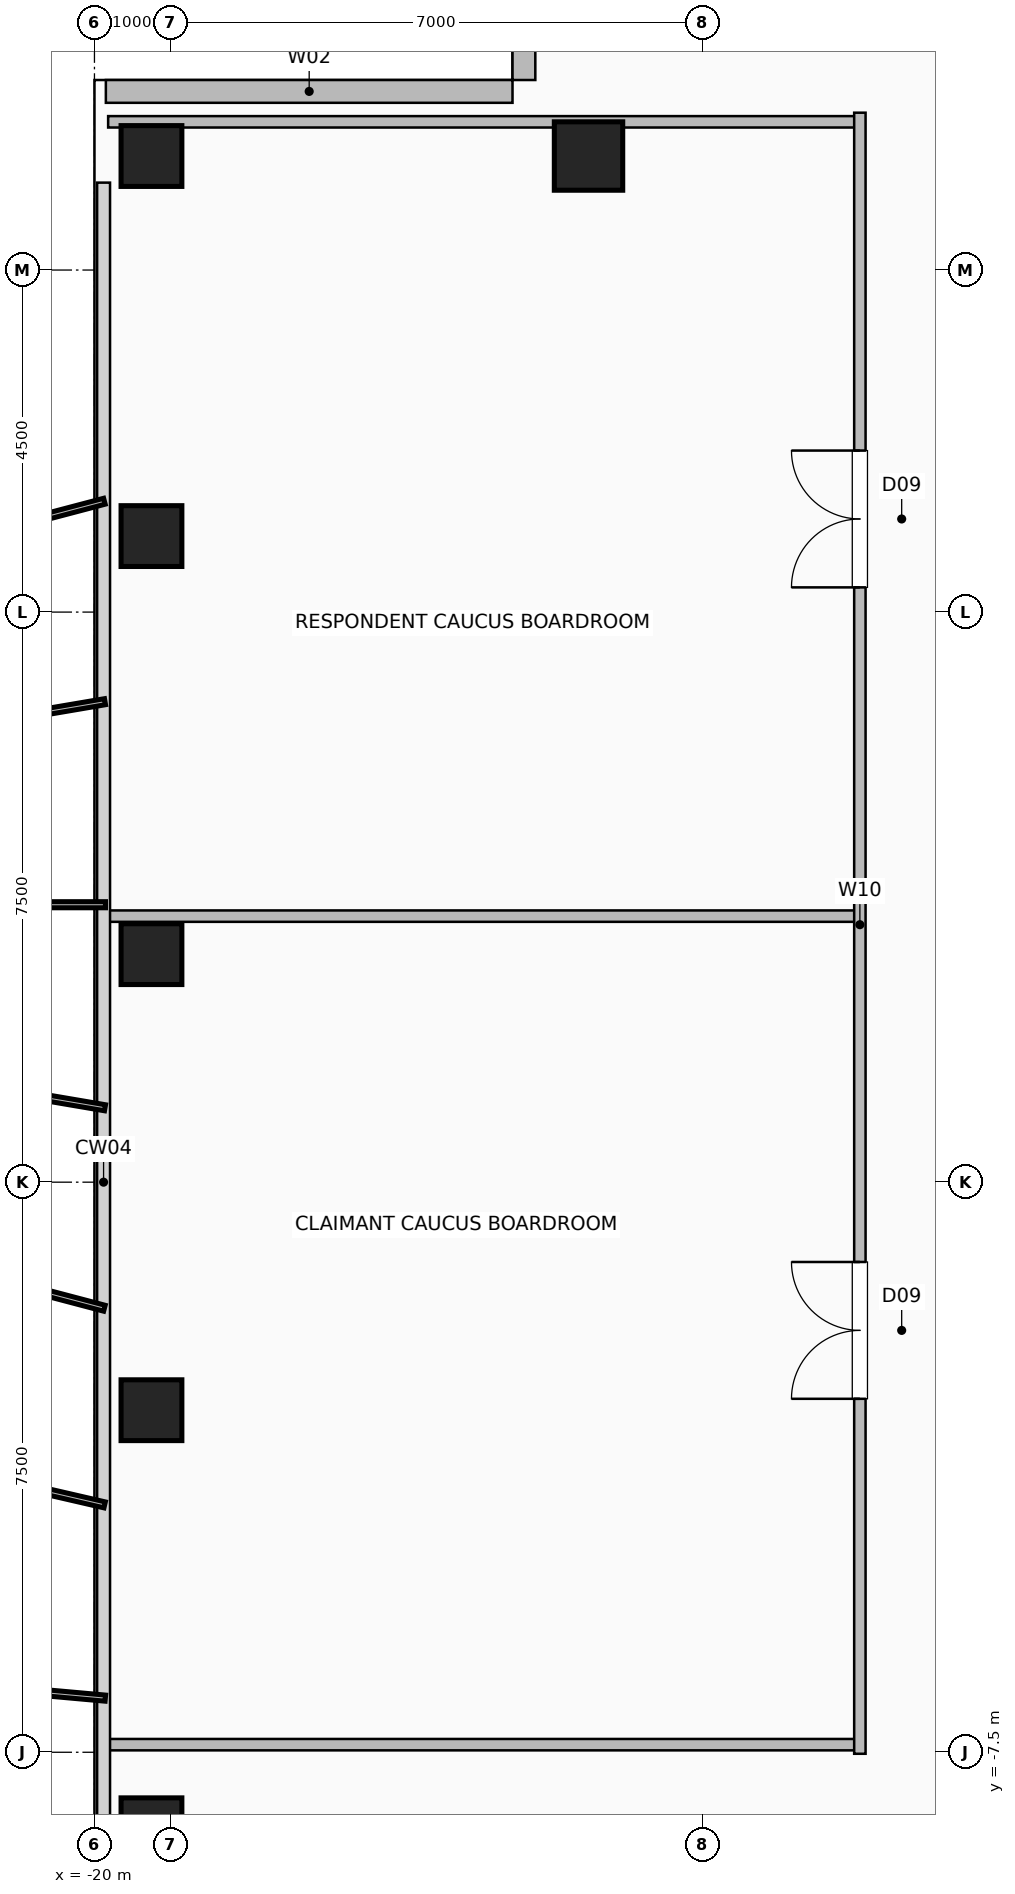
"""IFC4 building model, lengths in metres.
Left out: names, types, materials, properties, quantities, classifications, styles, units other than length and angle.
Written with IfcOpenShell. Run it as: python <this file> out.ifc"""

import sys

from ifc_helpers import new_model, si_unit, direction, frame, frame_2d, origin, origin_2d, place, context, subcontext, project, spatial, rectangle, hollow_rectangle, extrude, element, fill, save


model = new_model("IFC4")
c1 = context("Model", 3, precision=1e-05, world=origin(), true_north=direction((0.0, 1.0)))
c2 = subcontext(c1, "Body", "Model", "MODEL_VIEW")
j1 = project(units=[si_unit("LENGTHUNIT", "METRE"), si_unit("PLANEANGLEUNIT", "RADIAN")], contexts=[c1])
p1 = place(None, origin())
s1 = spatial("IfcSite", under=j1, at=p1, CompositionType="ELEMENT")
p2 = place(p1, origin())
s2 = spatial("IfcBuilding", under=s1, at=p2, CompositionType="ELEMENT")
p3 = place(p2, frame((0.0, 0.0, 184.2)))
s3 = spatial("IfcBuildingStorey", under=s2, at=p3, CompositionType="ELEMENT", Elevation=184.2)
for number, where, z_axis, x_axis in (
    (1, (-19.25, -8.5, 0.0), (0.0, 0.0, 1.0), (1.0, 0.0, 0.0)),
    (2, (-19.25, -3.0, 0.0), (0.0, 0.0, 1.0), (1.0, 0.0, 0.0)),
    (3, (-19.25, 3.0, 0.0), (0.0, 0.0, 1.0), (1.0, 0.0, 0.0)),
    (4, (-19.25, 8.5, 0.0), (0.0, 0.0, 1.0), (1.0, 0.0, 0.0)),
    (5, (-19.25, 13.5, 0.0), (0.0, 0.0, 1.0), (1.0, 0.0, 0.0)),
):
    element("IfcColumn", number, at=place(p3, frame(where, z_axis=z_axis, x_axis=x_axis)), inside=s3, PredefinedType="COLUMN", context=c2, shape_type="SweptSolid", body=[
        extrude(hollow_rectangle(XDim=0.8, YDim=0.8, WallThickness=0.04, at=origin_2d()), origin(), (0.0, 0.0, 1.0), 3.6),
    ])
p4 = place(p3, frame((-13.5, 13.5, 0.0), z_axis=(0.0, 0.0, 1.0), x_axis=(1.0, 0.0, 0.0)))
e6 = element("IfcColumn", 6, at=p4, inside=s3, PredefinedType="COLUMN", context=c2, shape_type="SweptSolid", body=[
    extrude(hollow_rectangle(XDim=0.9, YDim=0.9, WallThickness=0.045, at=origin_2d()), origin(), (0.0, 0.0, 1.0), 3.6),
])
p5 = place(p3, frame((-14.35, 19.85, 0.0), z_axis=(0.0, 0.0, 1.0), x_axis=(0.0, -1.0, 0.0)))
e7 = element("IfcWall", 7, at=p5, inside=s3, PredefinedType="SOLIDWALL", context=c2, shape_type="SweptSolid", body=[
    extrude(rectangle(XDim=5.35, YDim=0.3, at=frame_2d((2.675, 0.0))), origin(), (0.0, 0.0, 1.0), 3.36),
])
p6 = place(p5, frame((1.925, 0.0, 0.9)))
e8 = element("IfcOpeningElement", 8, at=p6, cuts=e7, PredefinedType="OPENING", context=c2, shape_type="SweptSolid", body=[
    extrude(rectangle(XDim=1.5, YDim=1.8, at=frame_2d((0.75, 0.9))), frame((0.0, 0.16, 0.0), z_axis=(0.0, -1.0, 0.0), x_axis=(1.0, 0.0, 0.0)), (0.0, 0.0, 1.0), 0.32),
])
p7 = place(p3, frame((-19.85, 14.35, 0.0), z_axis=(0.0, 0.0, 1.0), x_axis=(1.0, 0.0, 0.0)))
e9 = element("IfcWall", 9, at=p7, inside=s3, PredefinedType="SOLIDWALL", context=c2, shape_type="SweptSolid", body=[
    extrude(rectangle(XDim=5.35, YDim=0.3, at=frame_2d((2.675, 0.0))), origin(), (0.0, 0.0, 1.0), 3.36),
])
for number, where, z_axis, x_axis in (
    (10, (-19.82, -7.4, 0.0), (0.0, 0.0, 1.0), (1.0, 0.0, 0.0)),
    (11, (-19.82, 3.5, 0.0), (0.0, 0.0, 1.0), (1.0, 0.0, 0.0)),
    (12, (-19.82, 13.95, 0.0), (0.0, 0.0, 1.0), (1.0, 0.0, 0.0)),
):
    element("IfcWall", number, at=place(p3, frame(where, z_axis=z_axis, x_axis=x_axis)), inside=s3, PredefinedType="PARTITIONING", context=c2, shape_type="SweptSolid", body=[
        extrude(rectangle(XDim=9.89, YDim=0.15, at=frame_2d((4.945, 0.0))), origin(), (0.0, 0.0, 1.0), 3.36),
    ])
p8 = place(p3, frame((-9.93, -7.52, 0.0), z_axis=(0.0, 0.0, 1.0), x_axis=(0.0, 1.0, 0.0)))
e13 = element("IfcWall", 13, at=p8, inside=s3, PredefinedType="PARTITIONING", context=c2, shape_type="SweptSolid", body=[
    extrude(rectangle(XDim=21.59, YDim=0.15, at=frame_2d((10.795, 0.0))), origin(), (0.0, 0.0, 1.0), 3.36),
])
p9 = place(p8, frame((4.67, 0.0, 0.0)))
e14 = element("IfcOpeningElement", 14, at=p9, cuts=e13, PredefinedType="OPENING", context=c2, shape_type="SweptSolid", body=[
    extrude(rectangle(XDim=1.8, YDim=2.08, at=frame_2d((0.9, 1.04))), frame((0.0, 0.085, 0.0), z_axis=(0.0, -1.0, 0.0), x_axis=(1.0, 0.0, 0.0)), (0.0, 0.0, 1.0), 0.17),
])
p10 = place(p8, frame((15.345, 0.0, 0.0)))
e15 = element("IfcOpeningElement", 15, at=p10, cuts=e13, PredefinedType="OPENING", context=c2, shape_type="SweptSolid", body=[
    extrude(rectangle(XDim=1.8, YDim=2.08, at=frame_2d((0.9, 1.04))), frame((0.0, 0.085, 0.0), z_axis=(0.0, -1.0, 0.0), x_axis=(1.0, 0.0, 0.0)), (0.0, 0.0, 1.0), 0.17),
])
p11 = place(p9, origin())
e16 = element("IfcDoor", 16, at=p11, inside=s3, OperationType="DOUBLE_DOOR_SINGLE_SWING", PredefinedType="DOOR", context=c2, shape_type="SweptSolid", body=[
    extrude(rectangle(XDim=1.8, YDim=2.08, at=frame_2d((0.9, 1.04))), frame((0.0, 0.025, 0.0), z_axis=(0.0, -1.0, 0.0), x_axis=(1.0, 0.0, 0.0)), (0.0, 0.0, 1.0), 0.05),
])
fill(e14, e16)
p12 = place(p10, origin())
e17 = element("IfcDoor", 17, at=p12, inside=s3, OperationType="DOUBLE_DOOR_SINGLE_SWING", PredefinedType="DOOR", context=c2, shape_type="SweptSolid", body=[
    extrude(rectangle(XDim=1.8, YDim=2.08, at=frame_2d((0.9, 1.04))), frame((0.0, 0.025, 0.0), z_axis=(0.0, -1.0, 0.0), x_axis=(1.0, 0.0, 0.0)), (0.0, 0.0, 1.0), 0.05),
])
fill(e15, e17)
save(model, sys.argv[1])
